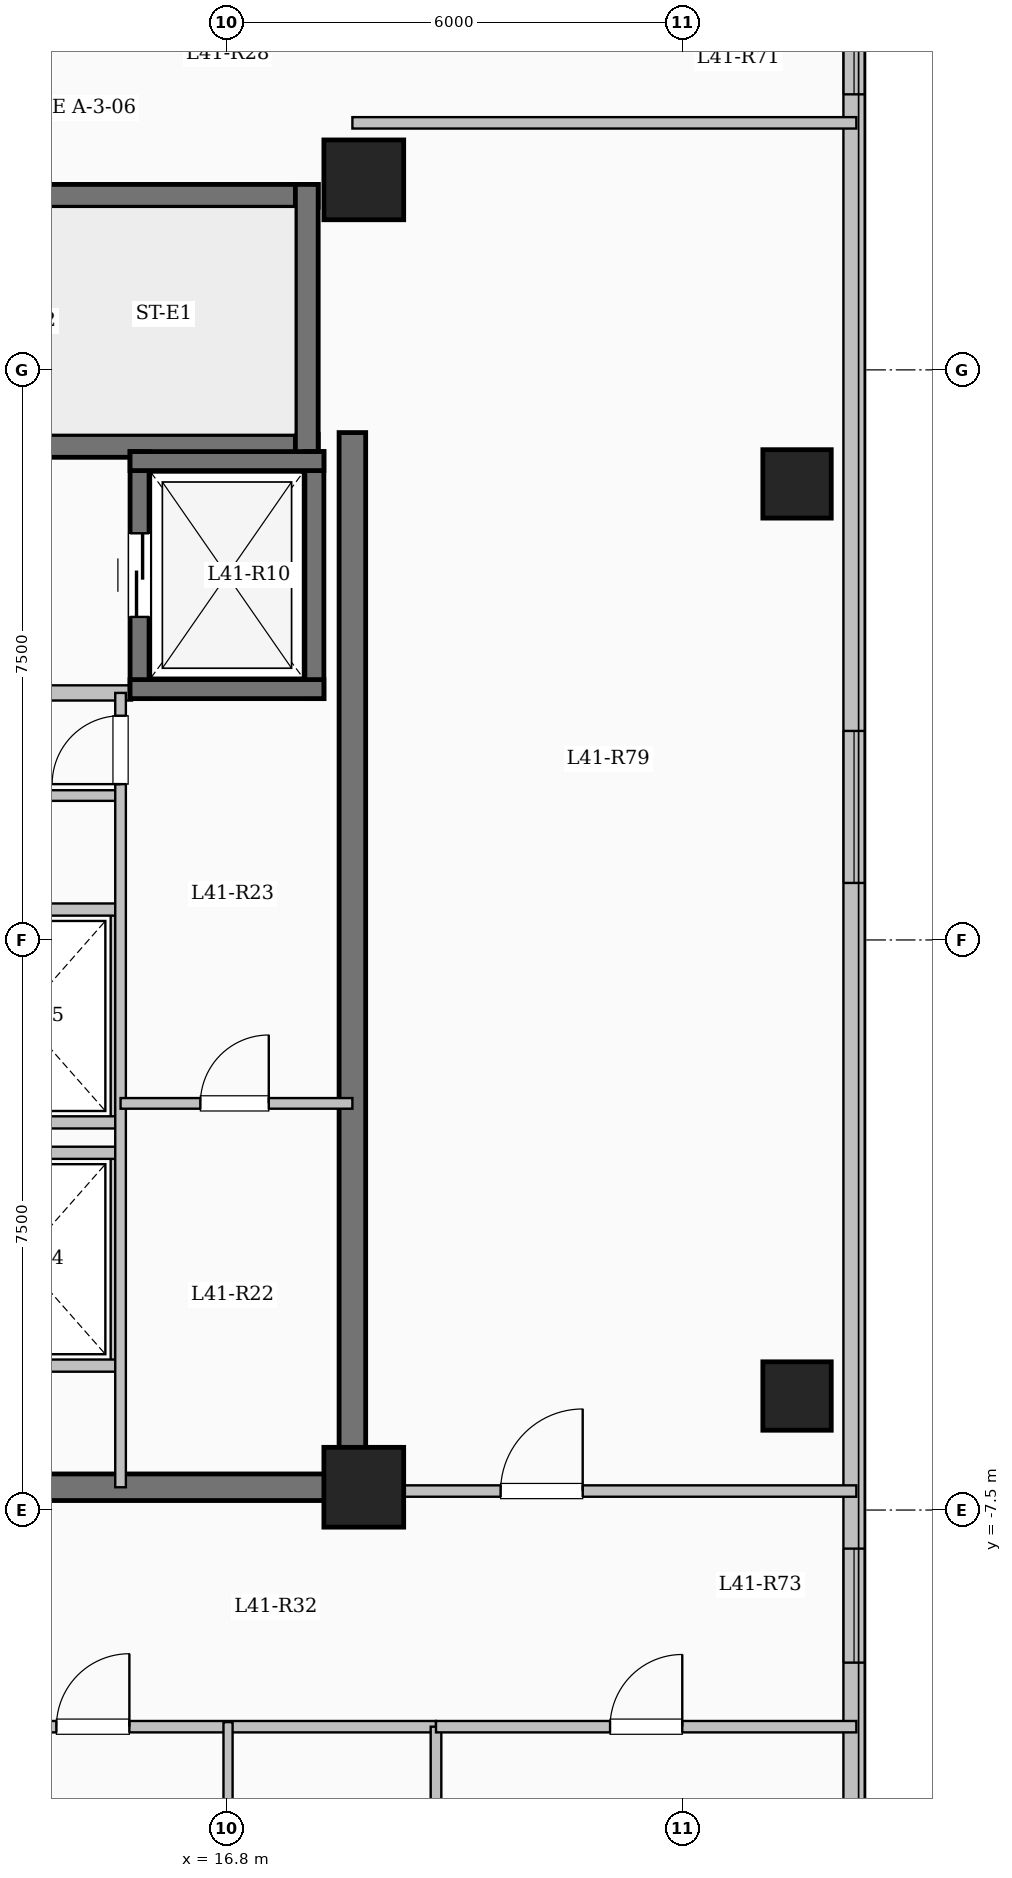
"""IFC4 building model, lengths in metres.
Left out: names, types, materials, properties, quantities, classifications, styles, units other than length and angle.
Written with IfcOpenShell. Run it as: python <this file> out.ifc"""

import sys

from ifc_helpers import new_model, si_unit, direction, frame, frame_2d, origin, origin_2d, place, context, subcontext, project, spatial, rectangle, extrude, element, fill, save


model = new_model("IFC4")
c1 = context("Model", 3, precision=1e-05, world=origin(), true_north=direction((0.0, 1.0)))
c2 = subcontext(c1, "Body", "Model", "MODEL_VIEW")
j1 = project(units=[si_unit("LENGTHUNIT", "METRE"), si_unit("PLANEANGLEUNIT", "RADIAN")], contexts=[c1])
p1 = place(None, origin())
s1 = spatial("IfcSite", under=j1, at=p1, CompositionType="ELEMENT")
p2 = place(p1, origin())
s2 = spatial("IfcBuilding", under=s1, at=p2, CompositionType="ELEMENT")
p3 = place(p2, frame((0.0, 0.0, 152.7)))
s3 = spatial("IfcBuildingStorey", under=s2, at=p3, CompositionType="ELEMENT", Elevation=152.7)
for number, where, z_axis, x_axis in (
    (1, (18.6, -7.2, 0.0), (0.0, 0.0, 1.0), (1.0, 0.0, 0.0)),
    (2, (18.6, 10.0, 0.0), (0.0, 0.0, 1.0), (1.0, 0.0, 0.0)),
):
    element("IfcColumn", number, at=place(p3, frame(where, z_axis=z_axis, x_axis=x_axis)), inside=s3, PredefinedType="COLUMN", context=c2, shape_type="SweptSolid", body=[
        extrude(rectangle(XDim=1.05, YDim=1.05, at=origin_2d()), origin(), (0.0, 0.0, 1.0), 3.35),
    ])
for number, where, z_axis, x_axis in (
    (3, (24.3, -6.0, 0.0), (0.0, 0.0, 1.0), (1.0, 0.0, 0.0)),
    (4, (24.3, 6.0, 0.0), (0.0, 0.0, 1.0), (1.0, 0.0, 0.0)),
):
    element("IfcColumn", number, at=place(p3, frame(where, z_axis=z_axis, x_axis=x_axis)), inside=s3, PredefinedType="COLUMN", context=c2, shape_type="SweptSolid", body=[
        extrude(rectangle(XDim=0.9, YDim=0.9, at=origin_2d()), origin(), (0.0, 0.0, 1.0), 3.35),
    ])
p4 = place(p3, frame((25.05, 17.25, 0.0), z_axis=(0.0, 0.0, 1.0), x_axis=(0.0, -1.0, 0.0)))
e5 = element("IfcWall", 5, at=p4, inside=s3, PredefinedType="SOLIDWALL", context=c2, shape_type="SweptSolid", body=[
    extrude(rectangle(XDim=34.5, YDim=0.28, at=frame_2d((17.25, 0.0))), origin(), (0.0, 0.0, 1.0), 3.1),
])
p5 = place(p4, frame((1.375, 0.0, 0.9)))
e6 = element("IfcOpeningElement", 6, at=p5, cuts=e5, PredefinedType="OPENING", context=c2, shape_type="SweptSolid", body=[
    extrude(rectangle(XDim=2.0, YDim=1.7, at=frame_2d((1.0, 0.85))), frame((0.0, 0.15, 0.0), z_axis=(0.0, -1.0, 0.0), x_axis=(1.0, 0.0, 0.0)), (0.0, 0.0, 1.0), 0.3),
])
p6 = place(p4, frame((5.125, 0.0, 0.95)))
e7 = element("IfcOpeningElement", 7, at=p6, cuts=e5, PredefinedType="OPENING", context=c2, shape_type="SweptSolid", body=[
    extrude(rectangle(XDim=1.0, YDim=1.5, at=frame_2d((0.5, 0.75))), frame((0.0, 0.15, 0.0), z_axis=(0.0, -1.0, 0.0), x_axis=(1.0, 0.0, 0.0)), (0.0, 0.0, 1.0), 0.3),
])
p7 = place(p4, frame((14.5, 0.0, 0.9)))
e8 = element("IfcOpeningElement", 8, at=p7, cuts=e5, PredefinedType="OPENING", context=c2, shape_type="SweptSolid", body=[
    extrude(rectangle(XDim=2.0, YDim=1.7, at=frame_2d((1.0, 0.85))), frame((0.0, 0.15, 0.0), z_axis=(0.0, -1.0, 0.0), x_axis=(1.0, 0.0, 0.0)), (0.0, 0.0, 1.0), 0.3),
])
p8 = place(p4, frame((25.258, 0.0, 0.9)))
e9 = element("IfcOpeningElement", 9, at=p8, cuts=e5, PredefinedType="OPENING", context=c2, shape_type="SweptSolid", body=[
    extrude(rectangle(XDim=1.5, YDim=1.65, at=frame_2d((0.75, 0.825))), frame((0.0, 0.15, 0.0), z_axis=(0.0, -1.0, 0.0), x_axis=(1.0, 0.0, 0.0)), (0.0, 0.0, 1.0), 0.3),
])
p9 = place(p4, frame((29.95, 0.0, 0.9)))
e10 = element("IfcOpeningElement", 10, at=p9, cuts=e5, PredefinedType="OPENING", context=c2, shape_type="SweptSolid", body=[
    extrude(rectangle(XDim=2.2, YDim=1.75, at=frame_2d((1.1, 0.875))), frame((0.0, 0.15, 0.0), z_axis=(0.0, -1.0, 0.0), x_axis=(1.0, 0.0, 0.0)), (0.0, 0.0, 1.0), 0.3),
])
p10 = place(p3, frame((10.0, 9.79, 0.0), z_axis=(0.0, 0.0, 1.0), x_axis=(1.0, 0.0, 0.0)))
e11 = element("IfcWall", 11, at=p10, inside=s3, PredefinedType="SHEAR", context=c2, shape_type="SweptSolid", body=[
    extrude(rectangle(XDim=8.0, YDim=0.3, at=frame_2d((4.0, 0.0))), origin(), (0.0, 0.0, 1.0), 3.35),
])
p11 = place(p3, frame((10.0, 6.5, 0.0), z_axis=(0.0, 0.0, 1.0), x_axis=(1.0, 0.0, 0.0)))
e12 = element("IfcWall", 12, at=p11, inside=s3, PredefinedType="SHEAR", context=c2, shape_type="SweptSolid", body=[
    extrude(rectangle(XDim=8.0, YDim=0.3, at=frame_2d((4.0, 0.0))), origin(), (0.0, 0.0, 1.0), 3.35),
])
p12 = place(p11, frame((0.55, 0.0, 0.0)))
e13 = element("IfcOpeningElement", 13, at=p12, cuts=e12, PredefinedType="OPENING", context=c2, shape_type="SweptSolid", body=[
    extrude(rectangle(XDim=1.0, YDim=2.15, at=frame_2d((0.5, 1.075))), frame((0.0, 0.16, 0.0), z_axis=(0.0, -1.0, 0.0), x_axis=(1.0, 0.0, 0.0)), (0.0, 0.0, 1.0), 0.32),
])
p13 = place(p3, frame((17.85, 6.35, 0.0), z_axis=(0.0, 0.0, 1.0), x_axis=(0.0, 1.0, 0.0)))
e14 = element("IfcWall", 14, at=p13, inside=s3, PredefinedType="SHEAR", context=c2, shape_type="SweptSolid", body=[
    extrude(rectangle(XDim=3.59, YDim=0.3, at=frame_2d((1.795, 0.0))), origin(), (0.0, 0.0, 1.0), 3.35),
])
p14 = place(p3, frame((10.15, 3.25, 0.0), z_axis=(0.0, 0.0, 1.0), x_axis=(1.0, 0.0, 0.0)))
e15 = element("IfcWall", 15, at=p14, inside=s3, PredefinedType="SOLIDWALL", context=c2, shape_type="SweptSolid", body=[
    extrude(rectangle(XDim=5.4, YDim=0.2, at=frame_2d((2.7, 0.0))), origin(), (0.0, 0.0, 1.0), 3.1),
])
p15 = place(p3, frame((15.65, 3.175, 0.0), z_axis=(0.0, 0.0, 1.0), x_axis=(0.0, 1.0, 0.0)))
e16 = element("IfcWall", 16, at=p15, inside=s3, PredefinedType="SHEAR", context=c2, shape_type="SweptSolid", body=[
    extrude(rectangle(XDim=3.25, YDim=0.25, at=frame_2d((1.625, 0.0))), origin(), (0.0, 0.0, 1.0), 3.35),
])
p16 = place(p15, frame((1.075, 0.0, 0.0)))
e17 = element("IfcOpeningElement", 17, at=p16, cuts=e16, PredefinedType="OPENING", context=c2, shape_type="SweptSolid", body=[
    extrude(rectangle(XDim=1.1, YDim=2.15, at=frame_2d((0.55, 1.075))), frame((0.0, 0.135, 0.0), z_axis=(0.0, -1.0, 0.0), x_axis=(1.0, 0.0, 0.0)), (0.0, 0.0, 1.0), 0.27),
])
p17 = place(p3, frame((17.95, 3.175, 0.0), z_axis=(0.0, 0.0, 1.0), x_axis=(0.0, 1.0, 0.0)))
e18 = element("IfcWall", 18, at=p17, inside=s3, PredefinedType="SHEAR", context=c2, shape_type="SweptSolid", body=[
    extrude(rectangle(XDim=3.25, YDim=0.25, at=frame_2d((1.625, 0.0))), origin(), (0.0, 0.0, 1.0), 3.35),
])
for number, where, z_axis, x_axis in (
    (19, (15.525, 3.3, 0.0), (0.0, 0.0, 1.0), (1.0, 0.0, 0.0)),
    (20, (15.525, 6.3, 0.0), (0.0, 0.0, 1.0), (1.0, 0.0, 0.0)),
):
    element("IfcWall", number, at=place(p3, frame(where, z_axis=z_axis, x_axis=x_axis)), inside=s3, PredefinedType="SHEAR", context=c2, shape_type="SweptSolid", body=[
        extrude(rectangle(XDim=2.55, YDim=0.25, at=frame_2d((1.275, 0.0))), origin(), (0.0, 0.0, 1.0), 3.35),
    ])
p18 = place(p3, frame((15.35, -5.6, 0.0), z_axis=(0.0, 0.0, 1.0), x_axis=(0.0, 1.0, 0.0)))
e21 = element("IfcWall", 21, at=p18, inside=s3, PredefinedType="SOLIDWALL", context=c2, shape_type="SweptSolid", body=[
    extrude(rectangle(XDim=2.8, YDim=0.16, at=frame_2d((1.4, 0.0))), origin(), (0.0, 0.0, 1.0), 3.1),
])
for number, where, z_axis, x_axis in (
    (22, (12.85, -5.6, 0.0), (0.0, 0.0, 1.0), (1.0, 0.0, 0.0)),
    (23, (12.85, -2.8, 0.0), (0.0, 0.0, 1.0), (1.0, 0.0, 0.0)),
):
    element("IfcWall", number, at=place(p3, frame(where, z_axis=z_axis, x_axis=x_axis)), inside=s3, PredefinedType="SOLIDWALL", context=c2, shape_type="SweptSolid", body=[
        extrude(rectangle(XDim=2.5, YDim=0.16, at=frame_2d((1.25, 0.0))), origin(), (0.0, 0.0, 1.0), 3.1),
    ])
p19 = place(p3, frame((15.35, -2.4, 0.0), z_axis=(0.0, 0.0, 1.0), x_axis=(0.0, 1.0, 0.0)))
e24 = element("IfcWall", 24, at=p19, inside=s3, PredefinedType="SOLIDWALL", context=c2, shape_type="SweptSolid", body=[
    extrude(rectangle(XDim=2.8, YDim=0.16, at=frame_2d((1.4, 0.0))), origin(), (0.0, 0.0, 1.0), 3.1),
])
for number, where, z_axis, x_axis in (
    (25, (12.85, -2.4, 0.0), (0.0, 0.0, 1.0), (1.0, 0.0, 0.0)),
    (26, (12.85, 0.4, 0.0), (0.0, 0.0, 1.0), (1.0, 0.0, 0.0)),
):
    element("IfcWall", number, at=place(p3, frame(where, z_axis=z_axis, x_axis=x_axis)), inside=s3, PredefinedType="SOLIDWALL", context=c2, shape_type="SweptSolid", body=[
        extrude(rectangle(XDim=2.5, YDim=0.16, at=frame_2d((1.25, 0.0))), origin(), (0.0, 0.0, 1.0), 3.1),
    ])
p20 = place(p3, frame((18.45, -7.375, 0.0), z_axis=(0.0, 0.0, 1.0), x_axis=(0.0, 1.0, 0.0)))
e27 = element("IfcWall", 27, at=p20, inside=s3, PredefinedType="SHEAR", context=c2, shape_type="SweptSolid", body=[
    extrude(rectangle(XDim=14.05, YDim=0.35, at=frame_2d((7.025, 0.0))), origin(), (0.0, 0.0, 1.0), 3.35),
])
p21 = place(p3, frame((10.075, -7.2, 0.0), z_axis=(0.0, 0.0, 1.0), x_axis=(1.0, 0.0, 0.0)))
e28 = element("IfcWall", 28, at=p21, inside=s3, PredefinedType="SHEAR", context=c2, shape_type="SweptSolid", body=[
    extrude(rectangle(XDim=8.55, YDim=0.35, at=frame_2d((4.275, 0.0))), origin(), (0.0, 0.0, 1.0), 3.35),
])
p22 = place(p3, frame((12.55, 1.9, 0.0), z_axis=(0.0, 0.0, 1.0), x_axis=(1.0, 0.0, 0.0)))
e29 = element("IfcWall", 29, at=p22, inside=s3, PredefinedType="PARTITIONING", context=c2, shape_type="SweptSolid", body=[
    extrude(rectangle(XDim=2.85, YDim=0.14, at=frame_2d((1.425, 0.0))), origin(), (0.0, 0.0, 1.0), 3.1),
])
p23 = place(p3, frame((15.4, -7.2, 0.0), z_axis=(0.0, 0.0, 1.0), x_axis=(0.0, 1.0, 0.0)))
e30 = element("IfcWall", 30, at=p23, inside=s3, PredefinedType="PARTITIONING", context=c2, shape_type="SweptSolid", body=[
    extrude(rectangle(XDim=10.45, YDim=0.14, at=frame_2d((5.225, 0.0))), origin(), (0.0, 0.0, 1.0), 3.1),
])
p24 = place(p23, frame((9.25, 0.0, 0.0)))
e31 = element("IfcOpeningElement", 31, at=p24, cuts=e30, PredefinedType="OPENING", context=c2, shape_type="SweptSolid", body=[
    extrude(rectangle(XDim=0.9, YDim=2.08, at=frame_2d((0.45, 1.04))), frame((0.0, 0.08, 0.0), z_axis=(0.0, -1.0, 0.0), x_axis=(1.0, 0.0, 0.0)), (0.0, 0.0, 1.0), 0.16),
])
p25 = place(p3, frame((15.4, -2.15, 0.0), z_axis=(0.0, 0.0, 1.0), x_axis=(1.0, 0.0, 0.0)))
e32 = element("IfcWall", 32, at=p25, inside=s3, PredefinedType="PARTITIONING", context=c2, shape_type="SweptSolid", body=[
    extrude(rectangle(XDim=3.05, YDim=0.14, at=frame_2d((1.525, 0.0))), origin(), (0.0, 0.0, 1.0), 3.1),
])
p26 = place(p25, frame((1.05, 0.0, 0.0)))
e33 = element("IfcOpeningElement", 33, at=p26, cuts=e32, PredefinedType="OPENING", context=c2, shape_type="SweptSolid", body=[
    extrude(rectangle(XDim=0.9, YDim=2.08, at=frame_2d((0.45, 1.04))), frame((0.0, 0.08, 0.0), z_axis=(0.0, -1.0, 0.0), x_axis=(1.0, 0.0, 0.0)), (0.0, 0.0, 1.0), 0.16),
])
p27 = place(p3, frame((8.55, -10.35, 0.0), z_axis=(0.0, 0.0, 1.0), x_axis=(1.0, 0.0, 0.0)))
e34 = element("IfcWall", 34, at=p27, inside=s3, PredefinedType="PARTITIONING", context=c2, shape_type="SweptSolid", body=[
    extrude(rectangle(XDim=11.0, YDim=0.15, at=frame_2d((5.5, 0.0))), origin(), (0.0, 0.0, 1.0), 3.1),
])
p28 = place(p27, frame((0.75, 0.0, 0.0)))
e35 = element("IfcOpeningElement", 35, at=p28, cuts=e34, PredefinedType="OPENING", context=c2, shape_type="SweptSolid", body=[
    extrude(rectangle(XDim=0.96, YDim=2.15, at=frame_2d((0.48, 1.075))), frame((0.0, 0.085, 0.0), z_axis=(0.0, -1.0, 0.0), x_axis=(1.0, 0.0, 0.0)), (0.0, 0.0, 1.0), 0.17),
])
p29 = place(p27, frame((6.006, 0.0, 0.0)))
e36 = element("IfcOpeningElement", 36, at=p29, cuts=e34, PredefinedType="OPENING", context=c2, shape_type="SweptSolid", body=[
    extrude(rectangle(XDim=0.96, YDim=2.15, at=frame_2d((0.48, 1.075))), frame((0.0, 0.085, 0.0), z_axis=(0.0, -1.0, 0.0), x_axis=(1.0, 0.0, 0.0)), (0.0, 0.0, 1.0), 0.17),
])
p30 = place(p3, frame((16.814, -13.51, 0.0), z_axis=(0.0, 0.0, 1.0), x_axis=(0.0, 1.0, 0.0)))
e37 = element("IfcWall", 37, at=p30, inside=s3, PredefinedType="PARTITIONING", context=c2, shape_type="SweptSolid", body=[
    extrude(rectangle(XDim=3.22, YDim=0.12, at=frame_2d((1.61, 0.0))), origin(), (0.0, 0.0, 1.0), 3.1),
])
p31 = place(p30, frame((1.14, 0.0, 0.0)))
e38 = element("IfcOpeningElement", 38, at=p31, cuts=e37, PredefinedType="OPENING", context=c2, shape_type="SweptSolid", body=[
    extrude(rectangle(XDim=0.88, YDim=2.1, at=frame_2d((0.44, 1.05))), frame((0.0, 0.07, 0.0), z_axis=(0.0, -1.0, 0.0), x_axis=(1.0, 0.0, 0.0)), (0.0, 0.0, 1.0), 0.14),
])
p32 = place(p3, frame((18.45, -7.25, 0.0), z_axis=(0.0, 0.0, 1.0), x_axis=(1.0, 0.0, 0.0)))
e39 = element("IfcWall", 39, at=p32, inside=s3, PredefinedType="PARTITIONING", context=c2, shape_type="SweptSolid", body=[
    extrude(rectangle(XDim=6.63, YDim=0.15, at=frame_2d((3.315, 0.0))), origin(), (0.0, 0.0, 1.0), 3.1),
])
p33 = place(p32, frame((1.95, 0.0, 0.0)))
e40 = element("IfcOpeningElement", 40, at=p33, cuts=e39, PredefinedType="OPENING", context=c2, shape_type="SweptSolid", body=[
    extrude(rectangle(XDim=1.08, YDim=2.15, at=frame_2d((0.54, 1.075))), frame((0.0, 0.085, 0.0), z_axis=(0.0, -1.0, 0.0), x_axis=(1.0, 0.0, 0.0)), (0.0, 0.0, 1.0), 0.17),
])
p34 = place(p3, frame((18.45, 10.75, 0.0), z_axis=(0.0, 0.0, 1.0), x_axis=(1.0, 0.0, 0.0)))
e41 = element("IfcWall", 41, at=p34, inside=s3, PredefinedType="PARTITIONING", context=c2, shape_type="SweptSolid", body=[
    extrude(rectangle(XDim=6.63, YDim=0.15, at=frame_2d((3.315, 0.0))), origin(), (0.0, 0.0, 1.0), 3.1),
])
p35 = place(p3, frame((19.55, -17.25, 0.0), z_axis=(0.0, 0.0, 1.0), x_axis=(0.0, 1.0, 0.0)))
e42 = element("IfcWall", 42, at=p35, inside=s3, PredefinedType="PARTITIONING", context=c2, shape_type="SweptSolid", body=[
    extrude(rectangle(XDim=6.9, YDim=0.14, at=frame_2d((3.45, 0.0))), origin(), (0.0, 0.0, 1.0), 3.1),
])
p36 = place(p3, frame((19.55, -10.35, 0.0), z_axis=(0.0, 0.0, 1.0), x_axis=(1.0, 0.0, 0.0)))
e43 = element("IfcWall", 43, at=p36, inside=s3, PredefinedType="PARTITIONING", context=c2, shape_type="SweptSolid", body=[
    extrude(rectangle(XDim=5.53, YDim=0.15, at=frame_2d((2.765, 0.0))), origin(), (0.0, 0.0, 1.0), 3.1),
])
p37 = place(p36, frame((2.29, 0.0, 0.0)))
e44 = element("IfcOpeningElement", 44, at=p37, cuts=e43, PredefinedType="OPENING", context=c2, shape_type="SweptSolid", body=[
    extrude(rectangle(XDim=0.95, YDim=2.15, at=frame_2d((0.475, 1.075))), frame((0.0, 0.085, 0.0), z_axis=(0.0, -1.0, 0.0), x_axis=(1.0, 0.0, 0.0)), (0.0, 0.0, 1.0), 0.17),
])
p38 = place(p6, origin())
e45 = element("IfcWindow", 45, at=p38, inside=s3, PartitioningType="SINGLE_PANEL", PredefinedType="WINDOW", context=c2, shape_type="SweptSolid", body=[
    extrude(rectangle(XDim=1.0, YDim=1.5, at=frame_2d((0.5, 0.75))), frame((0.0, 0.03, 0.0), z_axis=(0.0, -1.0, 0.0), x_axis=(1.0, 0.0, 0.0)), (0.0, 0.0, 1.0), 0.06),
])
fill(e7, e45)
p39 = place(p7, origin())
e46 = element("IfcWindow", 46, at=p39, inside=s3, PartitioningType="SINGLE_PANEL", PredefinedType="WINDOW", context=c2, shape_type="SweptSolid", body=[
    extrude(rectangle(XDim=2.0, YDim=1.7, at=frame_2d((1.0, 0.85))), frame((0.0, 0.03, 0.0), z_axis=(0.0, -1.0, 0.0), x_axis=(1.0, 0.0, 0.0)), (0.0, 0.0, 1.0), 0.06),
])
fill(e8, e46)
p40 = place(p8, origin())
e47 = element("IfcWindow", 47, at=p40, inside=s3, PartitioningType="SINGLE_PANEL", PredefinedType="WINDOW", context=c2, shape_type="SweptSolid", body=[
    extrude(rectangle(XDim=1.5, YDim=1.65, at=frame_2d((0.75, 0.825))), frame((0.0, 0.03, 0.0), z_axis=(0.0, -1.0, 0.0), x_axis=(1.0, 0.0, 0.0)), (0.0, 0.0, 1.0), 0.06),
])
fill(e9, e47)
p41 = place(p16, origin())
e48 = element("IfcDoor", 48, at=p41, inside=s3, OperationType="SLIDING_TO_LEFT", PredefinedType="DOOR", context=c2, shape_type="SweptSolid", body=[
    extrude(rectangle(XDim=1.1, YDim=2.15, at=frame_2d((0.55, 1.075))), frame((0.0, 0.025, 0.0), z_axis=(0.0, -1.0, 0.0), x_axis=(1.0, 0.0, 0.0)), (0.0, 0.0, 1.0), 0.05),
])
fill(e17, e48)
p42 = place(p24, origin())
e49 = element("IfcDoor", 49, at=p42, inside=s3, OperationType="SINGLE_SWING_LEFT", PredefinedType="DOOR", context=c2, shape_type="SweptSolid", body=[
    extrude(rectangle(XDim=0.9, YDim=2.08, at=frame_2d((0.45, 1.04))), frame((0.0, 0.025, 0.0), z_axis=(0.0, -1.0, 0.0), x_axis=(1.0, 0.0, 0.0)), (0.0, 0.0, 1.0), 0.05),
])
fill(e31, e49)
p43 = place(p26, origin())
e50 = element("IfcDoor", 50, at=p43, inside=s3, OperationType="SINGLE_SWING_RIGHT", PredefinedType="DOOR", context=c2, shape_type="SweptSolid", body=[
    extrude(rectangle(XDim=0.9, YDim=2.08, at=frame_2d((0.45, 1.04))), frame((0.0, 0.025, 0.0), z_axis=(0.0, -1.0, 0.0), x_axis=(1.0, 0.0, 0.0)), (0.0, 0.0, 1.0), 0.05),
])
fill(e33, e50)
p44 = place(p29, origin())
e51 = element("IfcDoor", 51, at=p44, inside=s3, OperationType="SINGLE_SWING_RIGHT", PredefinedType="DOOR", context=c2, shape_type="SweptSolid", body=[
    extrude(rectangle(XDim=0.96, YDim=2.15, at=frame_2d((0.48, 1.075))), frame((0.0, 0.025, 0.0), z_axis=(0.0, -1.0, 0.0), x_axis=(1.0, 0.0, 0.0)), (0.0, 0.0, 1.0), 0.05),
])
fill(e36, e51)
p45 = place(p37, origin())
e52 = element("IfcDoor", 52, at=p45, inside=s3, OperationType="SINGLE_SWING_RIGHT", PredefinedType="DOOR", context=c2, shape_type="SweptSolid", body=[
    extrude(rectangle(XDim=0.95, YDim=2.15, at=frame_2d((0.475, 1.075))), frame((0.0, 0.025, 0.0), z_axis=(0.0, -1.0, 0.0), x_axis=(1.0, 0.0, 0.0)), (0.0, 0.0, 1.0), 0.05),
])
fill(e44, e52)
p46 = place(p33, origin())
e53 = element("IfcDoor", 53, at=p46, inside=s3, OperationType="SINGLE_SWING_RIGHT", PredefinedType="DOOR", context=c2, shape_type="SweptSolid", body=[
    extrude(rectangle(XDim=1.08, YDim=2.15, at=frame_2d((0.54, 1.075))), frame((0.0, 0.025, 0.0), z_axis=(0.0, -1.0, 0.0), x_axis=(1.0, 0.0, 0.0)), (0.0, 0.0, 1.0), 0.05),
])
fill(e40, e53)
save(model, sys.argv[1])
